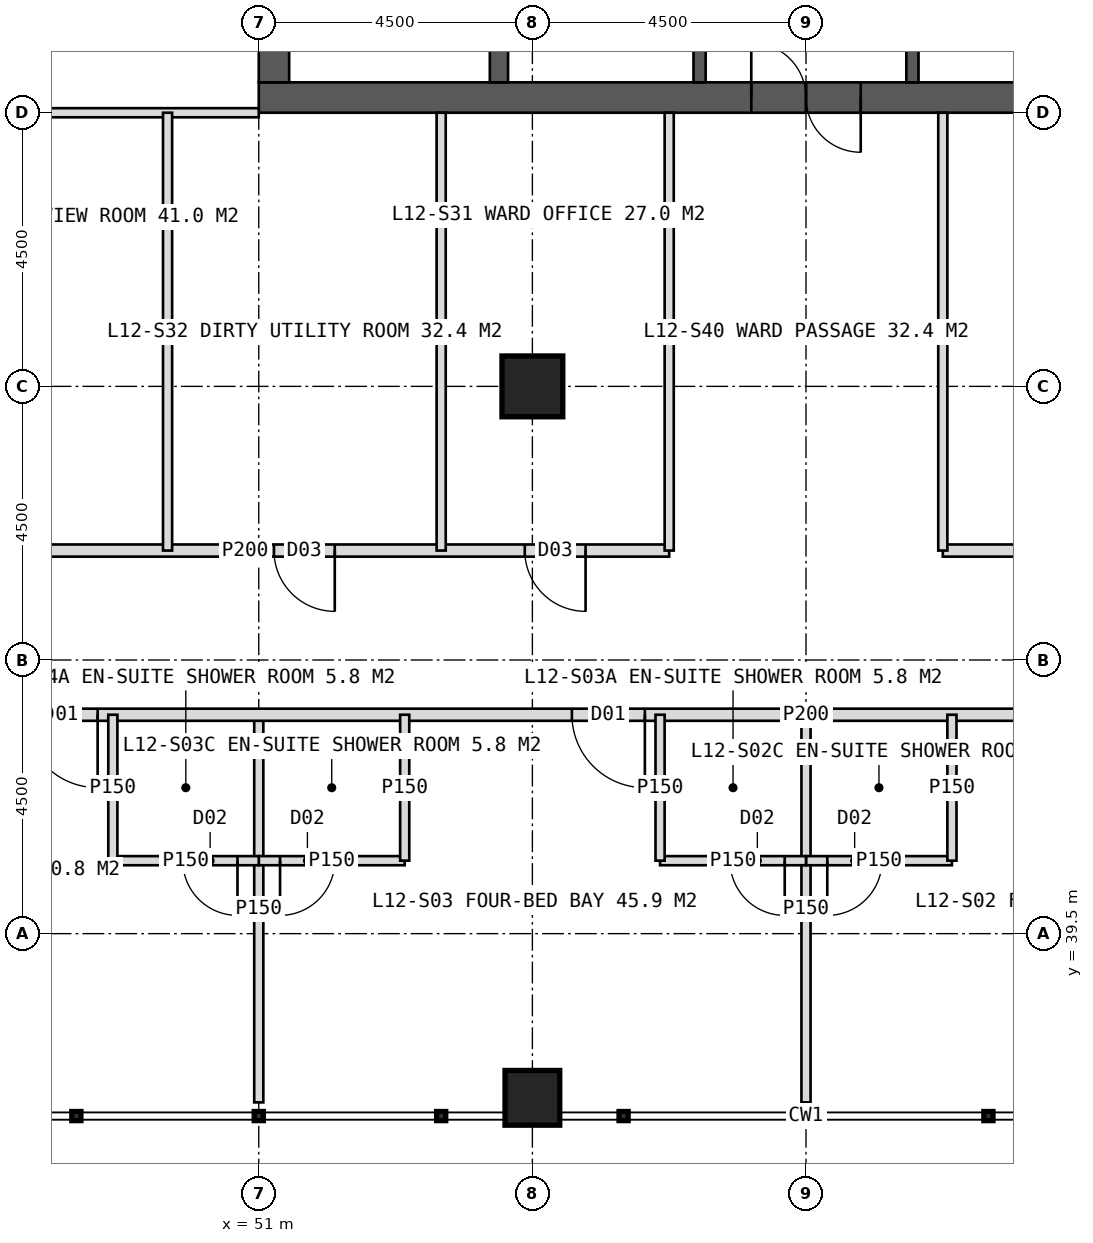
"""IFC4 building model, lengths in metres.
Left out: names, types, materials, properties, quantities, classifications, styles, units other than length and angle.
Written with IfcOpenShell. Run it as: python <this file> out.ifc"""

import sys

from ifc_helpers import new_model, si_unit, direction, frame, frame_2d, origin, origin_2d, place, context, subcontext, project, spatial, rectangle, hollow_rectangle, extrude, element, fill, save


model = new_model("IFC4")
c1 = context("Model", 3, precision=1e-05, world=origin(), true_north=direction((0.0, 1.0)))
c2 = subcontext(c1, "Body", "Model", "MODEL_VIEW")
j1 = project(units=[si_unit("LENGTHUNIT", "METRE"), si_unit("PLANEANGLEUNIT", "RADIAN")], contexts=[c1])
p1 = place(None, origin())
s1 = spatial("IfcSite", under=j1, at=p1, CompositionType="ELEMENT")
p2 = place(p1, origin())
s2 = spatial("IfcBuilding", under=s1, at=p2, CompositionType="ELEMENT")
p3 = place(p2, frame((0.0, 0.0, 55.0)))
s3 = spatial("IfcBuildingStorey", under=s2, at=p3, CompositionType="ELEMENT", Elevation=55.0)
p4 = place(p3, frame((51.0, 53.25, 0.0), z_axis=(0.0, 0.0, 1.0), x_axis=(1.0, 0.0, 0.0)))
e1 = element("IfcWall", 1, at=p4, inside=s3, PredefinedType="SHEAR", context=c2, shape_type="SweptSolid", body=[
    extrude(rectangle(XDim=18.0, YDim=0.5, at=frame_2d((9.0, 0.0))), origin(), (0.0, 0.0, 1.0), 4.0),
])
p5 = place(p4, frame((8.1, 0.0, 0.0)))
e2 = element("IfcOpeningElement", 2, at=p5, cuts=e1, PredefinedType="OPENING", context=c2, shape_type="SweptSolid", body=[
    extrude(rectangle(XDim=1.8, YDim=2.2, at=frame_2d((0.9, 1.1))), frame((0.0, 0.26, 0.0), z_axis=(0.0, -1.0, 0.0), x_axis=(1.0, 0.0, 0.0)), (0.0, 0.0, 1.0), 0.52),
])
p6 = place(p3, frame((51.25, 53.5, 0.0), z_axis=(0.0, 0.0, 1.0), x_axis=(0.0, 1.0, 0.0)))
e3 = element("IfcWall", 3, at=p6, inside=s3, PredefinedType="SHEAR", context=c2, shape_type="SweptSolid", body=[
    extrude(rectangle(XDim=17.0, YDim=0.5, at=frame_2d((8.5, 0.0))), origin(), (0.0, 0.0, 1.0), 4.0),
])
p7 = place(p6, frame((6.0, 0.0, 0.0)))
e4 = element("IfcOpeningElement", 4, at=p7, cuts=e3, PredefinedType="OPENING", context=c2, shape_type="SweptSolid", body=[
    extrude(rectangle(XDim=1.5, YDim=2.2, at=frame_2d((0.75, 1.1))), frame((0.0, 0.26, 0.0), z_axis=(0.0, -1.0, 0.0), x_axis=(1.0, 0.0, 0.0)), (0.0, 0.0, 1.0), 0.52),
])
p8 = place(p3, frame((54.95, 53.5, 0.0), z_axis=(0.0, 0.0, 1.0), x_axis=(0.0, 1.0, 0.0)))
e5 = element("IfcWall", 5, at=p8, inside=s3, PredefinedType="SHEAR", context=c2, shape_type="SweptSolid", body=[
    extrude(rectangle(XDim=17.0, YDim=0.3, at=frame_2d((8.5, 0.0))), origin(), (0.0, 0.0, 1.0), 4.0),
])
p9 = place(p3, frame((58.25, 53.5, 0.0), z_axis=(0.0, 0.0, 1.0), x_axis=(0.0, 1.0, 0.0)))
e6 = element("IfcWall", 6, at=p9, inside=s3, PredefinedType="SHEAR", context=c2, shape_type="SweptSolid", body=[
    extrude(rectangle(XDim=17.0, YDim=0.2, at=frame_2d((8.5, 0.0))), origin(), (0.0, 0.0, 1.0), 4.0),
])
p10 = place(p9, frame((1.375, 0.0, 0.0)))
e7 = element("IfcOpeningElement", 7, at=p10, cuts=e6, PredefinedType="OPENING", context=c2, shape_type="SweptSolid", body=[
    extrude(rectangle(XDim=1.4, YDim=2.2, at=frame_2d((0.7, 1.1))), frame((0.0, 0.11, 0.0), z_axis=(0.0, -1.0, 0.0), x_axis=(1.0, 0.0, 0.0)), (0.0, 0.0, 1.0), 0.22),
])
p11 = place(p9, frame((5.675, 0.0, 0.0)))
e8 = element("IfcOpeningElement", 8, at=p11, cuts=e6, PredefinedType="OPENING", context=c2, shape_type="SweptSolid", body=[
    extrude(rectangle(XDim=1.4, YDim=2.2, at=frame_2d((0.7, 1.1))), frame((0.0, 0.11, 0.0), z_axis=(0.0, -1.0, 0.0), x_axis=(1.0, 0.0, 0.0)), (0.0, 0.0, 1.0), 0.22),
])
p12 = place(p3, frame((61.75, 53.5, 0.0), z_axis=(0.0, 0.0, 1.0), x_axis=(0.0, 1.0, 0.0)))
e9 = element("IfcWall", 9, at=p12, inside=s3, PredefinedType="SHEAR", context=c2, shape_type="SweptSolid", body=[
    extrude(rectangle(XDim=17.0, YDim=0.2, at=frame_2d((8.5, 0.0))), origin(), (0.0, 0.0, 1.0), 4.0),
])
p13 = place(p12, frame((1.375, 0.0, 0.0)))
e10 = element("IfcOpeningElement", 10, at=p13, cuts=e9, PredefinedType="OPENING", context=c2, shape_type="SweptSolid", body=[
    extrude(rectangle(XDim=1.4, YDim=2.2, at=frame_2d((0.7, 1.1))), frame((0.0, 0.11, 0.0), z_axis=(0.0, -1.0, 0.0), x_axis=(1.0, 0.0, 0.0)), (0.0, 0.0, 1.0), 0.22),
])
p14 = place(p12, frame((5.675, 0.0, 0.0)))
e11 = element("IfcOpeningElement", 11, at=p14, cuts=e9, PredefinedType="OPENING", context=c2, shape_type="SweptSolid", body=[
    extrude(rectangle(XDim=1.4, YDim=2.2, at=frame_2d((0.7, 1.1))), frame((0.0, 0.11, 0.0), z_axis=(0.0, -1.0, 0.0), x_axis=(1.0, 0.0, 0.0)), (0.0, 0.0, 1.0), 0.22),
])
p15 = place(p3, frame((55.5, 48.5, 0.0), z_axis=(0.0, 0.0, 1.0), x_axis=(1.0, 0.0, 0.0)))
e12 = element("IfcColumn", 12, at=p15, inside=s3, PredefinedType="COLUMN", context=c2, shape_type="SweptSolid", body=[
    extrude(hollow_rectangle(XDim=1.0, YDim=1.0, WallThickness=0.1, at=origin_2d()), origin(), (0.0, 0.0, 1.0), 4.0),
])
p16 = place(p3, frame((55.5, 36.8, 0.0), z_axis=(0.0, 0.0, 1.0), x_axis=(1.0, 0.0, 0.0)))
e13 = element("IfcColumn", 13, at=p16, inside=s3, PredefinedType="COLUMN", context=c2, shape_type="SweptSolid", body=[
    extrude(hollow_rectangle(XDim=0.9, YDim=0.9, WallThickness=0.08, at=origin_2d()), origin(), (0.0, 0.0, 1.0), 4.0),
])
p17 = place(p3, frame((51.0, 53.0, 0.0), z_axis=(0.0, 0.0, 1.0), x_axis=(-1.0, 0.0, 0.0)))
e14 = element("IfcWall", 14, at=p17, inside=s3, PredefinedType="PARTITIONING", context=c2, shape_type="SweptSolid", body=[
    extrude(rectangle(XDim=7.2, YDim=0.15, at=frame_2d((3.6, 0.0))), origin(), (0.0, 0.0, 1.0), 3.75),
])
p18 = place(p3, frame((60.0, 43.1, 0.0), z_axis=(0.0, 0.0, 1.0), x_axis=(0.0, -1.0, 0.0)))
e15 = element("IfcWall", 15, at=p18, inside=s3, PredefinedType="PARTITIONING", context=c2, shape_type="SweptSolid", body=[
    extrude(rectangle(XDim=6.375, YDim=0.15, at=frame_2d((3.188, 0.0))), origin(), (0.0, 0.0, 1.0), 2.75),
])
p19 = place(p3, frame((51.0, 43.1, 0.0), z_axis=(0.0, 0.0, 1.0), x_axis=(0.0, -1.0, 0.0)))
e16 = element("IfcWall", 16, at=p19, inside=s3, PredefinedType="PARTITIONING", context=c2, shape_type="SweptSolid", body=[
    extrude(rectangle(XDim=6.375, YDim=0.15, at=frame_2d((3.188, 0.0))), origin(), (0.0, 0.0, 1.0), 3.75),
])
p20 = place(p3, frame((78.9, 43.1, 0.0), z_axis=(0.0, 0.0, 1.0), x_axis=(-1.0, 0.0, 0.0)))
e17 = element("IfcWall", 17, at=p20, inside=s3, PredefinedType="PARTITIONING", context=c2, shape_type="SweptSolid", body=[
    extrude(rectangle(XDim=37.8, YDim=0.2, at=frame_2d((18.9, 0.0))), origin(), (0.0, 0.0, 1.0), 3.75),
])
p21 = place(p20, frame((2.65, 0.0, 0.0)))
e18 = element("IfcOpeningElement", 18, at=p21, cuts=e17, PredefinedType="OPENING", context=c2, shape_type="SweptSolid", body=[
    extrude(rectangle(XDim=1.2, YDim=2.2, at=frame_2d((0.6, 1.1))), frame((0.0, 0.11, 0.0), z_axis=(0.0, -1.0, 0.0), x_axis=(1.0, 0.0, 0.0)), (0.0, 0.0, 1.0), 0.22),
])
p22 = place(p20, frame((12.55, 0.0, 0.0)))
e19 = element("IfcOpeningElement", 19, at=p22, cuts=e17, PredefinedType="OPENING", context=c2, shape_type="SweptSolid", body=[
    extrude(rectangle(XDim=1.2, YDim=2.2, at=frame_2d((0.6, 1.1))), frame((0.0, 0.11, 0.0), z_axis=(0.0, -1.0, 0.0), x_axis=(1.0, 0.0, 0.0)), (0.0, 0.0, 1.0), 0.22),
])
p23 = place(p20, frame((21.55, 0.0, 0.0)))
e20 = element("IfcOpeningElement", 20, at=p23, cuts=e17, PredefinedType="OPENING", context=c2, shape_type="SweptSolid", body=[
    extrude(rectangle(XDim=1.2, YDim=2.2, at=frame_2d((0.6, 1.1))), frame((0.0, 0.11, 0.0), z_axis=(0.0, -1.0, 0.0), x_axis=(1.0, 0.0, 0.0)), (0.0, 0.0, 1.0), 0.22),
])
p24 = place(p20, frame((30.55, 0.0, 0.0)))
e21 = element("IfcOpeningElement", 21, at=p24, cuts=e17, PredefinedType="OPENING", context=c2, shape_type="SweptSolid", body=[
    extrude(rectangle(XDim=1.2, YDim=2.2, at=frame_2d((0.6, 1.1))), frame((0.0, 0.11, 0.0), z_axis=(0.0, -1.0, 0.0), x_axis=(1.0, 0.0, 0.0)), (0.0, 0.0, 1.0), 0.22),
])
p25 = place(p3, frame((62.4, 40.7, 0.0), z_axis=(0.0, 0.0, 1.0), x_axis=(-1.0, 0.0, 0.0)))
e22 = element("IfcWall", 22, at=p25, inside=s3, PredefinedType="PARTITIONING", context=c2, shape_type="SweptSolid", body=[
    extrude(rectangle(XDim=2.4, YDim=0.15, at=frame_2d((1.2, 0.0))), origin(), (0.0, 0.0, 1.0), 3.75),
])
p26 = place(p25, frame((1.15, 0.0, 0.0)))
e23 = element("IfcOpeningElement", 23, at=p26, cuts=e22, PredefinedType="OPENING", context=c2, shape_type="SweptSolid", body=[
    extrude(rectangle(XDim=0.9, YDim=2.1, at=frame_2d((0.45, 1.05))), frame((0.0, 0.085, 0.0), z_axis=(0.0, -1.0, 0.0), x_axis=(1.0, 0.0, 0.0)), (0.0, 0.0, 1.0), 0.17),
])
p27 = place(p3, frame((62.4, 43.1, 0.0), z_axis=(0.0, 0.0, 1.0), x_axis=(0.0, -1.0, 0.0)))
e24 = element("IfcWall", 24, at=p27, inside=s3, PredefinedType="PARTITIONING", context=c2, shape_type="SweptSolid", body=[
    extrude(rectangle(XDim=2.4, YDim=0.15, at=frame_2d((1.2, 0.0))), origin(), (0.0, 0.0, 1.0), 3.75),
])
p28 = place(p3, frame((60.0, 40.7, 0.0), z_axis=(0.0, 0.0, 1.0), x_axis=(-1.0, 0.0, 0.0)))
e25 = element("IfcWall", 25, at=p28, inside=s3, PredefinedType="PARTITIONING", context=c2, shape_type="SweptSolid", body=[
    extrude(rectangle(XDim=2.4, YDim=0.15, at=frame_2d((1.2, 0.0))), origin(), (0.0, 0.0, 1.0), 3.75),
])
p29 = place(p28, frame((0.35, 0.0, 0.0)))
e26 = element("IfcOpeningElement", 26, at=p29, cuts=e25, PredefinedType="OPENING", context=c2, shape_type="SweptSolid", body=[
    extrude(rectangle(XDim=0.9, YDim=2.1, at=frame_2d((0.45, 1.05))), frame((0.0, 0.085, 0.0), z_axis=(0.0, -1.0, 0.0), x_axis=(1.0, 0.0, 0.0)), (0.0, 0.0, 1.0), 0.17),
])
p30 = place(p3, frame((57.6, 43.1, 0.0), z_axis=(0.0, 0.0, 1.0), x_axis=(0.0, -1.0, 0.0)))
e27 = element("IfcWall", 27, at=p30, inside=s3, PredefinedType="PARTITIONING", context=c2, shape_type="SweptSolid", body=[
    extrude(rectangle(XDim=2.4, YDim=0.15, at=frame_2d((1.2, 0.0))), origin(), (0.0, 0.0, 1.0), 3.75),
])
p31 = place(p3, frame((53.4, 40.7, 0.0), z_axis=(0.0, 0.0, 1.0), x_axis=(-1.0, 0.0, 0.0)))
e28 = element("IfcWall", 28, at=p31, inside=s3, PredefinedType="PARTITIONING", context=c2, shape_type="SweptSolid", body=[
    extrude(rectangle(XDim=2.4, YDim=0.15, at=frame_2d((1.2, 0.0))), origin(), (0.0, 0.0, 1.0), 3.75),
])
p32 = place(p31, frame((1.15, 0.0, 0.0)))
e29 = element("IfcOpeningElement", 29, at=p32, cuts=e28, PredefinedType="OPENING", context=c2, shape_type="SweptSolid", body=[
    extrude(rectangle(XDim=0.9, YDim=2.1, at=frame_2d((0.45, 1.05))), frame((0.0, 0.085, 0.0), z_axis=(0.0, -1.0, 0.0), x_axis=(1.0, 0.0, 0.0)), (0.0, 0.0, 1.0), 0.17),
])
p33 = place(p3, frame((53.4, 43.1, 0.0), z_axis=(0.0, 0.0, 1.0), x_axis=(0.0, -1.0, 0.0)))
e30 = element("IfcWall", 30, at=p33, inside=s3, PredefinedType="PARTITIONING", context=c2, shape_type="SweptSolid", body=[
    extrude(rectangle(XDim=2.4, YDim=0.15, at=frame_2d((1.2, 0.0))), origin(), (0.0, 0.0, 1.0), 3.75),
])
p34 = place(p3, frame((51.0, 40.7, 0.0), z_axis=(0.0, 0.0, 1.0), x_axis=(-1.0, 0.0, 0.0)))
e31 = element("IfcWall", 31, at=p34, inside=s3, PredefinedType="PARTITIONING", context=c2, shape_type="SweptSolid", body=[
    extrude(rectangle(XDim=2.4, YDim=0.15, at=frame_2d((1.2, 0.0))), origin(), (0.0, 0.0, 1.0), 3.75),
])
p35 = place(p34, frame((0.35, 0.0, 0.0)))
e32 = element("IfcOpeningElement", 32, at=p35, cuts=e31, PredefinedType="OPENING", context=c2, shape_type="SweptSolid", body=[
    extrude(rectangle(XDim=0.9, YDim=2.1, at=frame_2d((0.45, 1.05))), frame((0.0, 0.085, 0.0), z_axis=(0.0, -1.0, 0.0), x_axis=(1.0, 0.0, 0.0)), (0.0, 0.0, 1.0), 0.17),
])
p36 = place(p3, frame((48.6, 43.1, 0.0), z_axis=(0.0, 0.0, 1.0), x_axis=(0.0, -1.0, 0.0)))
e33 = element("IfcWall", 33, at=p36, inside=s3, PredefinedType="PARTITIONING", context=c2, shape_type="SweptSolid", body=[
    extrude(rectangle(XDim=2.4, YDim=0.15, at=frame_2d((1.2, 0.0))), origin(), (0.0, 0.0, 1.0), 3.75),
])
p37 = place(p3, frame((76.2, 45.8, 0.0), z_axis=(0.0, 0.0, 1.0), x_axis=(-1.0, 0.0, 0.0)))
e34 = element("IfcWall", 34, at=p37, inside=s3, PredefinedType="PARTITIONING", context=c2, shape_type="SweptSolid", body=[
    extrude(rectangle(XDim=13.95, YDim=0.2, at=frame_2d((6.975, 0.0))), origin(), (0.0, 0.0, 1.0), 3.75),
])
p38 = place(p37, frame((10.075, 0.0, 0.0)))
e35 = element("IfcOpeningElement", 35, at=p38, cuts=e34, PredefinedType="OPENING", context=c2, shape_type="SweptSolid", body=[
    extrude(rectangle(XDim=1.0, YDim=2.1, at=frame_2d((0.5, 1.05))), frame((0.0, 0.11, 0.0), z_axis=(0.0, -1.0, 0.0), x_axis=(1.0, 0.0, 0.0)), (0.0, 0.0, 1.0), 0.22),
])
p39 = place(p3, frame((57.75, 45.8, 0.0), z_axis=(0.0, 0.0, 1.0), x_axis=(-1.0, 0.0, 0.0)))
e36 = element("IfcWall", 36, at=p39, inside=s3, PredefinedType="PARTITIONING", context=c2, shape_type="SweptSolid", body=[
    extrude(rectangle(XDim=13.95, YDim=0.2, at=frame_2d((6.975, 0.0))), origin(), (0.0, 0.0, 1.0), 3.75),
])
p40 = place(p39, frame((1.375, 0.0, 0.0)))
e37 = element("IfcOpeningElement", 37, at=p40, cuts=e36, PredefinedType="OPENING", context=c2, shape_type="SweptSolid", body=[
    extrude(rectangle(XDim=1.0, YDim=2.1, at=frame_2d((0.5, 1.05))), frame((0.0, 0.11, 0.0), z_axis=(0.0, -1.0, 0.0), x_axis=(1.0, 0.0, 0.0)), (0.0, 0.0, 1.0), 0.22),
])
p41 = place(p39, frame((5.5, 0.0, 0.0)))
e38 = element("IfcOpeningElement", 38, at=p41, cuts=e36, PredefinedType="OPENING", context=c2, shape_type="SweptSolid", body=[
    extrude(rectangle(XDim=1.0, YDim=2.1, at=frame_2d((0.5, 1.05))), frame((0.0, 0.11, 0.0), z_axis=(0.0, -1.0, 0.0), x_axis=(1.0, 0.0, 0.0)), (0.0, 0.0, 1.0), 0.22),
])
p42 = place(p39, frame((10.6, 0.0, 0.0)))
e39 = element("IfcOpeningElement", 39, at=p42, cuts=e36, PredefinedType="OPENING", context=c2, shape_type="SweptSolid", body=[
    extrude(rectangle(XDim=1.0, YDim=2.1, at=frame_2d((0.5, 1.05))), frame((0.0, 0.11, 0.0), z_axis=(0.0, -1.0, 0.0), x_axis=(1.0, 0.0, 0.0)), (0.0, 0.0, 1.0), 0.22),
])
for number, where, z_axis, x_axis in (
    (40, (62.25, 53.0, 0.0), (0.0, 0.0, 1.0), (0.0, -1.0, 0.0)),
    (41, (57.75, 53.0, 0.0), (0.0, 0.0, 1.0), (0.0, -1.0, 0.0)),
    (42, (54.0, 53.0, 0.0), (0.0, 0.0, 1.0), (0.0, -1.0, 0.0)),
    (43, (49.5, 53.0, 0.0), (0.0, 0.0, 1.0), (0.0, -1.0, 0.0)),
):
    element("IfcWall", number, at=place(p3, frame(where, z_axis=z_axis, x_axis=x_axis)), inside=s3, PredefinedType="PARTITIONING", context=c2, shape_type="SweptSolid", body=[
        extrude(rectangle(XDim=7.2, YDim=0.15, at=frame_2d((3.6, 0.0))), origin(), (0.0, 0.0, 1.0), 3.75),
    ])
p43 = place(p26, origin())
e44 = element("IfcDoor", 44, at=p43, inside=s3, OperationType="SINGLE_SWING_RIGHT", PredefinedType="DOOR", context=c2, shape_type="SweptSolid", body=[
    extrude(rectangle(XDim=0.9, YDim=2.1, at=frame_2d((0.45, 1.05))), frame((0.0, 0.025, 0.0), z_axis=(0.0, -1.0, 0.0), x_axis=(1.0, 0.0, 0.0)), (0.0, 0.0, 1.0), 0.05),
])
fill(e23, e44)
p44 = place(p23, origin())
e45 = element("IfcDoor", 45, at=p44, inside=s3, OperationType="SINGLE_SWING_LEFT", PredefinedType="DOOR", context=c2, shape_type="SweptSolid", body=[
    extrude(rectangle(XDim=1.2, YDim=2.2, at=frame_2d((0.6, 1.1))), frame((0.0, 0.025, 0.0), z_axis=(0.0, -1.0, 0.0), x_axis=(1.0, 0.0, 0.0)), (0.0, 0.0, 1.0), 0.05),
])
fill(e20, e45)
p45 = place(p29, origin())
e46 = element("IfcDoor", 46, at=p45, inside=s3, OperationType="SINGLE_SWING_LEFT", PredefinedType="DOOR", context=c2, shape_type="SweptSolid", body=[
    extrude(rectangle(XDim=0.9, YDim=2.1, at=frame_2d((0.45, 1.05))), frame((0.0, 0.025, 0.0), z_axis=(0.0, -1.0, 0.0), x_axis=(1.0, 0.0, 0.0)), (0.0, 0.0, 1.0), 0.05),
])
fill(e26, e46)
p46 = place(p32, origin())
e47 = element("IfcDoor", 47, at=p46, inside=s3, OperationType="SINGLE_SWING_RIGHT", PredefinedType="DOOR", context=c2, shape_type="SweptSolid", body=[
    extrude(rectangle(XDim=0.9, YDim=2.1, at=frame_2d((0.45, 1.05))), frame((0.0, 0.025, 0.0), z_axis=(0.0, -1.0, 0.0), x_axis=(1.0, 0.0, 0.0)), (0.0, 0.0, 1.0), 0.05),
])
fill(e29, e47)
p47 = place(p24, origin())
e48 = element("IfcDoor", 48, at=p47, inside=s3, OperationType="SINGLE_SWING_LEFT", PredefinedType="DOOR", context=c2, shape_type="SweptSolid", body=[
    extrude(rectangle(XDim=1.2, YDim=2.2, at=frame_2d((0.6, 1.1))), frame((0.0, 0.025, 0.0), z_axis=(0.0, -1.0, 0.0), x_axis=(1.0, 0.0, 0.0)), (0.0, 0.0, 1.0), 0.05),
])
fill(e21, e48)
p48 = place(p35, origin())
e49 = element("IfcDoor", 49, at=p48, inside=s3, OperationType="SINGLE_SWING_LEFT", PredefinedType="DOOR", context=c2, shape_type="SweptSolid", body=[
    extrude(rectangle(XDim=0.9, YDim=2.1, at=frame_2d((0.45, 1.05))), frame((0.0, 0.025, 0.0), z_axis=(0.0, -1.0, 0.0), x_axis=(1.0, 0.0, 0.0)), (0.0, 0.0, 1.0), 0.05),
])
fill(e32, e49)
p49 = place(p40, origin())
e50 = element("IfcDoor", 50, at=p49, inside=s3, OperationType="SINGLE_SWING_LEFT", PredefinedType="DOOR", context=c2, shape_type="SweptSolid", body=[
    extrude(rectangle(XDim=1.0, YDim=2.1, at=frame_2d((0.5, 1.05))), frame((0.0, 0.025, 0.0), z_axis=(0.0, -1.0, 0.0), x_axis=(1.0, 0.0, 0.0)), (0.0, 0.0, 1.0), 0.05),
])
fill(e37, e50)
p50 = place(p41, origin())
e51 = element("IfcDoor", 51, at=p50, inside=s3, OperationType="SINGLE_SWING_LEFT", PredefinedType="DOOR", context=c2, shape_type="SweptSolid", body=[
    extrude(rectangle(XDim=1.0, YDim=2.1, at=frame_2d((0.5, 1.05))), frame((0.0, 0.025, 0.0), z_axis=(0.0, -1.0, 0.0), x_axis=(1.0, 0.0, 0.0)), (0.0, 0.0, 1.0), 0.05),
])
fill(e38, e51)
p51 = place(p5, origin())
e52 = element("IfcDoor", 52, at=p51, inside=s3, OperationType="DOUBLE_DOOR_SINGLE_SWING", PredefinedType="DOOR", context=c2, shape_type="SweptSolid", body=[
    extrude(rectangle(XDim=1.8, YDim=2.2, at=frame_2d((0.9, 1.1))), frame((0.0, 0.025, 0.0), z_axis=(0.0, -1.0, 0.0), x_axis=(1.0, 0.0, 0.0)), (0.0, 0.0, 1.0), 0.05),
])
fill(e2, e52)
save(model, sys.argv[1])
